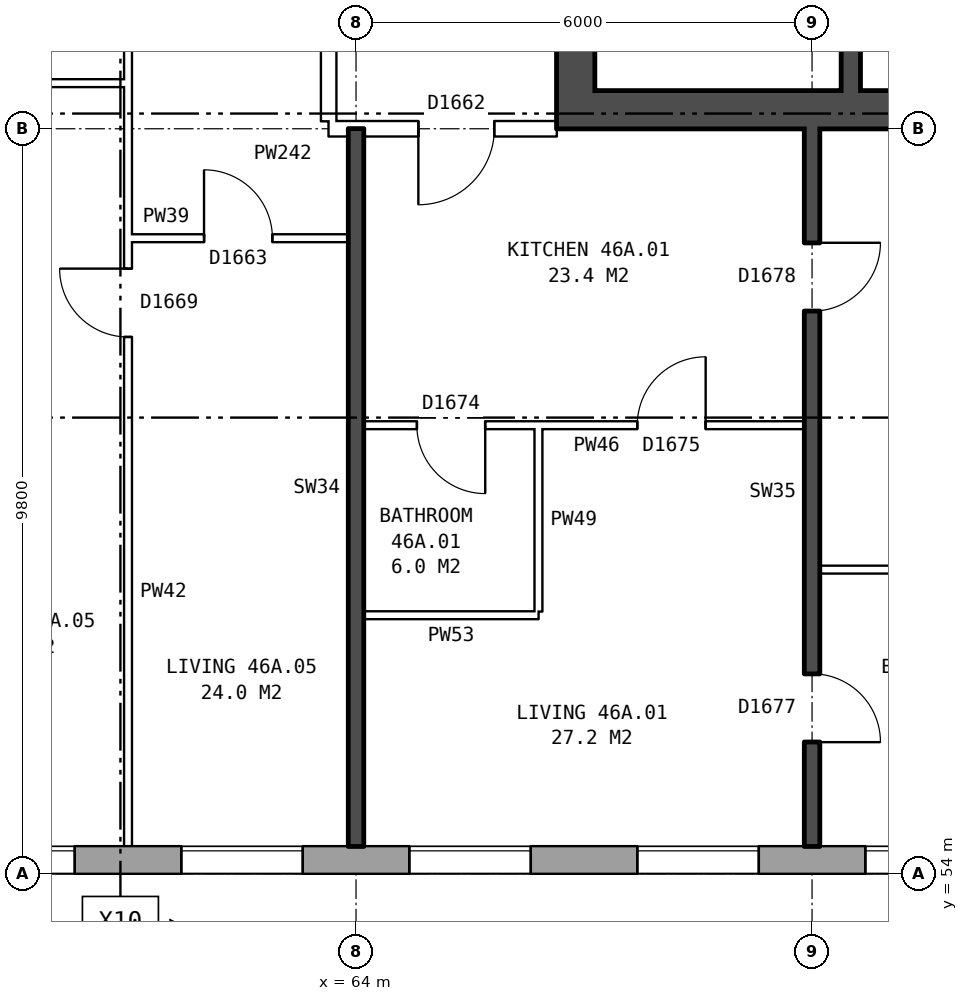
"""IFC4 building model, lengths in metres.
Left out: names, types, materials, properties, quantities, classifications, styles, units other than length and angle.
Written with IfcOpenShell. Run it as: python <this file> out.ifc"""

import sys

from ifc_helpers import new_model, si_unit, direction, frame, frame_2d, origin, place, context, subcontext, project, spatial, rectangle, extrude, element, fill, save


model = new_model("IFC4")
c1 = context("Model", 3, precision=1e-05, world=origin(), true_north=direction((0.0, 1.0)))
c2 = subcontext(c1, "Body", "Model", "MODEL_VIEW")
j1 = project(units=[si_unit("LENGTHUNIT", "METRE"), si_unit("PLANEANGLEUNIT", "RADIAN")], contexts=[c1])
p1 = place(None, origin())
s1 = spatial("IfcSite", under=j1, at=p1, CompositionType="ELEMENT")
p2 = place(p1, origin())
s2 = spatial("IfcBuilding", under=s1, at=p2, CompositionType="ELEMENT")
p3 = place(p2, frame((0.0, 0.0, 164.0)))
s3 = spatial("IfcBuildingStorey", under=s2, at=p3, CompositionType="ELEMENT", Elevation=164.0)
p4 = place(p3, frame((31.575, 54.18, 0.0), z_axis=(0.0, 0.0, 1.0), x_axis=(1.0, 0.0, 0.0)))
e1 = element("IfcWall", 1, at=p4, inside=s3, PredefinedType="STANDARD", context=c2, shape_type="SweptSolid", body=[
    extrude(rectangle(XDim=41.351, YDim=0.36, at=frame_2d((20.675, 0.0))), origin(), (0.0, 0.0, 1.0), 2.85),
])
p5 = place(p4, frame((3.125, 0.0, 0.8)))
e2 = element("IfcOpeningElement", 2, at=p5, cuts=e1, PredefinedType="OPENING", context=c2, shape_type="SweptSolid", body=[
    extrude(rectangle(XDim=1.6, YDim=1.8, at=frame_2d((0.8, 0.9))), frame((0.0, 0.19, 0.0), z_axis=(0.0, -1.0, 0.0), x_axis=(1.0, 0.0, 0.0)), (0.0, 0.0, 1.0), 0.38),
])
p6 = place(p4, frame((6.125, 0.0, 0.8)))
e3 = element("IfcOpeningElement", 3, at=p6, cuts=e1, PredefinedType="OPENING", context=c2, shape_type="SweptSolid", body=[
    extrude(rectangle(XDim=1.6, YDim=1.8, at=frame_2d((0.8, 0.9))), frame((0.0, 0.19, 0.0), z_axis=(0.0, -1.0, 0.0), x_axis=(1.0, 0.0, 0.0)), (0.0, 0.0, 1.0), 0.38),
])
p7 = place(p4, frame((9.125, 0.0, 0.8)))
e4 = element("IfcOpeningElement", 4, at=p7, cuts=e1, PredefinedType="OPENING", context=c2, shape_type="SweptSolid", body=[
    extrude(rectangle(XDim=1.6, YDim=1.8, at=frame_2d((0.8, 0.9))), frame((0.0, 0.19, 0.0), z_axis=(0.0, -1.0, 0.0), x_axis=(1.0, 0.0, 0.0)), (0.0, 0.0, 1.0), 0.38),
])
p8 = place(p4, frame((12.125, 0.0, 0.8)))
e5 = element("IfcOpeningElement", 5, at=p8, cuts=e1, PredefinedType="OPENING", context=c2, shape_type="SweptSolid", body=[
    extrude(rectangle(XDim=1.6, YDim=1.8, at=frame_2d((0.8, 0.9))), frame((0.0, 0.19, 0.0), z_axis=(0.0, -1.0, 0.0), x_axis=(1.0, 0.0, 0.0)), (0.0, 0.0, 1.0), 0.38),
])
p9 = place(p4, frame((15.125, 0.0, 0.8)))
e6 = element("IfcOpeningElement", 6, at=p9, cuts=e1, PredefinedType="OPENING", context=c2, shape_type="SweptSolid", body=[
    extrude(rectangle(XDim=1.6, YDim=1.8, at=frame_2d((0.8, 0.9))), frame((0.0, 0.19, 0.0), z_axis=(0.0, -1.0, 0.0), x_axis=(1.0, 0.0, 0.0)), (0.0, 0.0, 1.0), 0.38),
])
p10 = place(p4, frame((17.575, 0.0, 1.55)))
e7 = element("IfcOpeningElement", 7, at=p10, cuts=e1, PredefinedType="OPENING", context=c2, shape_type="SweptSolid", body=[
    extrude(rectangle(XDim=1.0, YDim=0.9, at=frame_2d((0.5, 0.45))), frame((0.0, 0.19, 0.0), z_axis=(0.0, -1.0, 0.0), x_axis=(1.0, 0.0, 0.0)), (0.0, 0.0, 1.0), 0.38),
])
p11 = place(p4, frame((20.625, 0.0, 0.25)))
e8 = element("IfcOpeningElement", 8, at=p11, cuts=e1, PredefinedType="OPENING", context=c2, shape_type="SweptSolid", body=[
    extrude(rectangle(XDim=0.6, YDim=1.5, at=frame_2d((0.3, 0.75))), frame((0.0, 0.19, 0.0), z_axis=(0.0, -1.0, 0.0), x_axis=(1.0, 0.0, 0.0)), (0.0, 0.0, 1.0), 0.38),
])
p12 = place(p4, frame((24.125, 0.0, 0.8)))
e9 = element("IfcOpeningElement", 9, at=p12, cuts=e1, PredefinedType="OPENING", context=c2, shape_type="SweptSolid", body=[
    extrude(rectangle(XDim=1.6, YDim=1.8, at=frame_2d((0.8, 0.9))), frame((0.0, 0.19, 0.0), z_axis=(0.0, -1.0, 0.0), x_axis=(1.0, 0.0, 0.0)), (0.0, 0.0, 1.0), 0.38),
])
p13 = place(p4, frame((27.125, 0.0, 0.8)))
e10 = element("IfcOpeningElement", 10, at=p13, cuts=e1, PredefinedType="OPENING", context=c2, shape_type="SweptSolid", body=[
    extrude(rectangle(XDim=1.6, YDim=1.8, at=frame_2d((0.8, 0.9))), frame((0.0, 0.19, 0.0), z_axis=(0.0, -1.0, 0.0), x_axis=(1.0, 0.0, 0.0)), (0.0, 0.0, 1.0), 0.38),
])
p14 = place(p4, frame((30.125, 0.0, 0.8)))
e11 = element("IfcOpeningElement", 11, at=p14, cuts=e1, PredefinedType="OPENING", context=c2, shape_type="SweptSolid", body=[
    extrude(rectangle(XDim=1.6, YDim=1.8, at=frame_2d((0.8, 0.9))), frame((0.0, 0.19, 0.0), z_axis=(0.0, -1.0, 0.0), x_axis=(1.0, 0.0, 0.0)), (0.0, 0.0, 1.0), 0.38),
])
p15 = place(p4, frame((33.125, 0.0, 0.8)))
e12 = element("IfcOpeningElement", 12, at=p15, cuts=e1, PredefinedType="OPENING", context=c2, shape_type="SweptSolid", body=[
    extrude(rectangle(XDim=1.6, YDim=1.8, at=frame_2d((0.8, 0.9))), frame((0.0, 0.19, 0.0), z_axis=(0.0, -1.0, 0.0), x_axis=(1.0, 0.0, 0.0)), (0.0, 0.0, 1.0), 0.38),
])
p16 = place(p4, frame((36.125, 0.0, 0.8)))
e13 = element("IfcOpeningElement", 13, at=p16, cuts=e1, PredefinedType="OPENING", context=c2, shape_type="SweptSolid", body=[
    extrude(rectangle(XDim=1.6, YDim=1.8, at=frame_2d((0.8, 0.9))), frame((0.0, 0.19, 0.0), z_axis=(0.0, -1.0, 0.0), x_axis=(1.0, 0.0, 0.0)), (0.0, 0.0, 1.0), 0.38),
])
p17 = place(p4, frame((39.125, 0.0, 0.8)))
e14 = element("IfcOpeningElement", 14, at=p17, cuts=e1, PredefinedType="OPENING", context=c2, shape_type="SweptSolid", body=[
    extrude(rectangle(XDim=1.6, YDim=1.8, at=frame_2d((0.8, 0.9))), frame((0.0, 0.19, 0.0), z_axis=(0.0, -1.0, 0.0), x_axis=(1.0, 0.0, 0.0)), (0.0, 0.0, 1.0), 0.38),
])
p18 = place(p4, frame((19.225, 0.0, 0.15)))
e15 = element("IfcOpeningElement", 15, at=p18, cuts=e1, PredefinedType="OPENING", context=c2, shape_type="SweptSolid", body=[
    extrude(rectangle(XDim=1.0, YDim=0.9, at=frame_2d((0.5, 0.45))), frame((0.0, 0.19, 0.0), z_axis=(0.0, -1.0, 0.0), x_axis=(1.0, 0.0, 0.0)), (0.0, 0.0, 1.0), 0.38),
])
p19 = place(p4, frame((21.525, 0.0, 0.15)))
e16 = element("IfcOpeningElement", 16, at=p19, cuts=e1, PredefinedType="OPENING", context=c2, shape_type="SweptSolid", body=[
    extrude(rectangle(XDim=0.6, YDim=0.9, at=frame_2d((0.3, 0.45))), frame((0.0, 0.19, 0.0), z_axis=(0.0, -1.0, 0.0), x_axis=(1.0, 0.0, 0.0)), (0.0, 0.0, 1.0), 0.38),
])
p20 = place(p4, frame((22.625, 0.0, 1.65)))
e17 = element("IfcOpeningElement", 17, at=p20, cuts=e1, PredefinedType="OPENING", context=c2, shape_type="SweptSolid", body=[
    extrude(rectangle(XDim=0.6, YDim=0.9, at=frame_2d((0.3, 0.45))), frame((0.0, 0.19, 0.0), z_axis=(0.0, -1.0, 0.0), x_axis=(1.0, 0.0, 0.0)), (0.0, 0.0, 1.0), 0.38),
])
p21 = place(p3, frame((66.89, 63.8, 0.0), z_axis=(0.0, 0.0, 1.0), x_axis=(0.0, 1.0, 0.0)))
e18 = element("IfcWall", 18, at=p21, inside=s3, PredefinedType="SHEAR", context=c2, shape_type="SweptSolid", body=[
    extrude(rectangle(XDim=12.4, YDim=0.5, at=frame_2d((6.2, 0.0))), origin(), (0.0, 0.0, 1.0), 2.85),
])
p22 = place(p21, frame((1.325, 0.0, 0.0)))
e19 = element("IfcOpeningElement", 19, at=p22, cuts=e18, PredefinedType="OPENING", context=c2, shape_type="SweptSolid", body=[
    extrude(rectangle(XDim=1.1, YDim=2.1, at=frame_2d((0.55, 1.05))), frame((0.0, 0.26, 0.0), z_axis=(0.0, -1.0, 0.0), x_axis=(1.0, 0.0, 0.0)), (0.0, 0.0, 1.0), 0.52),
])
p23 = place(p21, frame((3.6, 0.0, 0.0)))
e20 = element("IfcOpeningElement", 20, at=p23, cuts=e18, PredefinedType="OPENING", context=c2, shape_type="SweptSolid", body=[
    extrude(rectangle(XDim=1.1, YDim=2.1, at=frame_2d((0.55, 1.05))), frame((0.0, 0.26, 0.0), z_axis=(0.0, -1.0, 0.0), x_axis=(1.0, 0.0, 0.0)), (0.0, 0.0, 1.0), 0.52),
])
p24 = place(p21, frame((5.8, 0.0, 0.0)))
e21 = element("IfcOpeningElement", 21, at=p24, cuts=e18, PredefinedType="OPENING", context=c2, shape_type="SweptSolid", body=[
    extrude(rectangle(XDim=1.1, YDim=2.1, at=frame_2d((0.55, 1.05))), frame((0.0, 0.26, 0.0), z_axis=(0.0, -1.0, 0.0), x_axis=(1.0, 0.0, 0.0)), (0.0, 0.0, 1.0), 0.52),
])
p25 = place(p21, frame((8.0, 0.0, 0.0)))
e22 = element("IfcOpeningElement", 22, at=p25, cuts=e18, PredefinedType="OPENING", context=c2, shape_type="SweptSolid", body=[
    extrude(rectangle(XDim=1.1, YDim=2.1, at=frame_2d((0.55, 1.05))), frame((0.0, 0.26, 0.0), z_axis=(0.0, -1.0, 0.0), x_axis=(1.0, 0.0, 0.0)), (0.0, 0.0, 1.0), 0.52),
])
p26 = place(p21, frame((9.9, 0.0, 0.0)))
e23 = element("IfcOpeningElement", 23, at=p26, cuts=e18, PredefinedType="OPENING", context=c2, shape_type="SweptSolid", body=[
    extrude(rectangle(XDim=1.1, YDim=2.1, at=frame_2d((0.55, 1.05))), frame((0.0, 0.26, 0.0), z_axis=(0.0, -1.0, 0.0), x_axis=(1.0, 0.0, 0.0)), (0.0, 0.0, 1.0), 0.52),
])
p27 = place(p3, frame((67.14, 64.05, 0.0), z_axis=(0.0, 0.0, 1.0), x_axis=(1.0, 0.0, 0.0)))
e24 = element("IfcWall", 24, at=p27, inside=s3, PredefinedType="SHEAR", context=c2, shape_type="SweptSolid", body=[
    extrude(rectangle(XDim=8.0, YDim=0.5, at=frame_2d((4.0, 0.0))), origin(), (0.0, 0.0, 1.0), 2.85),
])
p28 = place(p3, frame((70.51, 64.3, 0.0), z_axis=(0.0, 0.0, 1.0), x_axis=(0.0, 1.0, 0.0)))
e25 = element("IfcWall", 25, at=p28, inside=s3, PredefinedType="SHEAR", context=c2, shape_type="SweptSolid", body=[
    extrude(rectangle(XDim=2.425, YDim=0.25, at=frame_2d((1.212, 0.0))), origin(), (0.0, 0.0, 1.0), 2.85),
])
p29 = place(p3, frame((63.64, 63.9, 0.0), z_axis=(0.0, 0.0, 1.0), x_axis=(0.0, 1.0, 0.0)))
e26 = element("IfcWall", 26, at=p29, inside=s3, PredefinedType="PARTITIONING", context=c2, shape_type="SweptSolid", body=[
    extrude(rectangle(XDim=12.2, YDim=0.2, at=frame_2d((6.1, 0.0))), origin(), (0.0, 0.0, 1.0), 2.85),
])
p30 = place(p29, frame((5.1, 0.0, 0.0)))
e27 = element("IfcOpeningElement", 27, at=p30, cuts=e26, PredefinedType="OPENING", context=c2, shape_type="SweptSolid", body=[
    extrude(rectangle(XDim=2.0, YDim=2.1, at=frame_2d((1.0, 1.05))), frame((0.0, 0.11, 0.0), z_axis=(0.0, -1.0, 0.0), x_axis=(1.0, 0.0, 0.0)), (0.0, 0.0, 1.0), 0.22),
])
p31 = place(p3, frame((64.1, 57.4, 0.0), z_axis=(0.0, 0.0, 1.0), x_axis=(1.0, 0.0, 0.0)))
e28 = element("IfcWall", 28, at=p31, inside=s3, PredefinedType="PARTITIONING", context=c2, shape_type="SweptSolid", body=[
    extrude(rectangle(XDim=2.3, YDim=0.1, at=frame_2d((1.15, 0.0))), origin(), (0.0, 0.0, 1.0), 2.85),
])
p32 = place(p3, frame((70.1, 58.0, 0.0), z_axis=(0.0, 0.0, 1.0), x_axis=(1.0, 0.0, 0.0)))
e29 = element("IfcWall", 29, at=p32, inside=s3, PredefinedType="PARTITIONING", context=c2, shape_type="SweptSolid", body=[
    extrude(rectangle(XDim=5.54, YDim=0.1, at=frame_2d((2.77, 0.0))), origin(), (0.0, 0.0, 1.0), 2.85),
])
p33 = place(p3, frame((64.1, 59.9, 0.0), z_axis=(0.0, 0.0, 1.0), x_axis=(1.0, 0.0, 0.0)))
e30 = element("IfcWall", 30, at=p33, inside=s3, PredefinedType="PARTITIONING", context=c2, shape_type="SweptSolid", body=[
    extrude(rectangle(XDim=5.8, YDim=0.1, at=frame_2d((2.9, 0.0))), origin(), (0.0, 0.0, 1.0), 2.85),
])
p34 = place(p33, frame((3.6, 0.0, 0.0)))
e31 = element("IfcOpeningElement", 31, at=p34, cuts=e30, PredefinedType="OPENING", context=c2, shape_type="SweptSolid", body=[
    extrude(rectangle(XDim=0.9, YDim=2.1, at=frame_2d((0.45, 1.05))), frame((0.0, 0.06, 0.0), z_axis=(0.0, -1.0, 0.0), x_axis=(1.0, 0.0, 0.0)), (0.0, 0.0, 1.0), 0.12),
])
p35 = place(p33, frame((0.7, 0.0, 0.0)))
e32 = element("IfcOpeningElement", 32, at=p35, cuts=e30, PredefinedType="OPENING", context=c2, shape_type="SweptSolid", body=[
    extrude(rectangle(XDim=0.9, YDim=2.1, at=frame_2d((0.45, 1.05))), frame((0.0, 0.06, 0.0), z_axis=(0.0, -1.0, 0.0), x_axis=(1.0, 0.0, 0.0)), (0.0, 0.0, 1.0), 0.12),
])
p36 = place(p3, frame((61.0, 62.36, 0.0), z_axis=(0.0, 0.0, 1.0), x_axis=(1.0, 0.0, 0.0)))
e33 = element("IfcWall", 33, at=p36, inside=s3, PredefinedType="PARTITIONING", context=c2, shape_type="SweptSolid", body=[
    extrude(rectangle(XDim=2.9, YDim=0.1, at=frame_2d((1.45, 0.0))), origin(), (0.0, 0.0, 1.0), 2.85),
])
p37 = place(p36, frame((1.0, 0.0, 0.0)))
e34 = element("IfcOpeningElement", 34, at=p37, cuts=e33, PredefinedType="OPENING", context=c2, shape_type="SweptSolid", body=[
    extrude(rectangle(XDim=0.9, YDim=2.1, at=frame_2d((0.45, 1.05))), frame((0.0, 0.06, 0.0), z_axis=(0.0, -1.0, 0.0), x_axis=(1.0, 0.0, 0.0)), (0.0, 0.0, 1.0), 0.12),
])
p38 = place(p3, frame((63.64, 63.8, 0.0), z_axis=(0.0, 0.0, 1.0), x_axis=(1.0, 0.0, 0.0)))
e35 = element("IfcWall", 35, at=p38, inside=s3, PredefinedType="PARTITIONING", context=c2, shape_type="SweptSolid", body=[
    extrude(rectangle(XDim=3.0, YDim=0.2, at=frame_2d((1.5, 0.0))), origin(), (0.0, 0.0, 1.0), 2.85),
])
p39 = place(p38, frame((1.18, 0.0, 0.0)))
e36 = element("IfcOpeningElement", 36, at=p39, cuts=e35, PredefinedType="OPENING", context=c2, shape_type="SweptSolid", body=[
    extrude(rectangle(XDim=1.0, YDim=2.1, at=frame_2d((0.5, 1.05))), frame((0.0, 0.11, 0.0), z_axis=(0.0, -1.0, 0.0), x_axis=(1.0, 0.0, 0.0)), (0.0, 0.0, 1.0), 0.22),
])
p40 = place(p3, frame((58.1, 64.4, 0.0), z_axis=(0.0, 0.0, 1.0), x_axis=(1.0, 0.0, 0.0)))
e37 = element("IfcWall", 37, at=p40, inside=s3, PredefinedType="PARTITIONING", context=c2, shape_type="SweptSolid", body=[
    extrude(rectangle(XDim=2.9, YDim=0.1, at=frame_2d((1.45, 0.0))), origin(), (0.0, 0.0, 1.0), 2.85),
])
p41 = place(p3, frame((61.0, 54.36, 0.0), z_axis=(0.0, 0.0, 1.0), x_axis=(0.0, 1.0, 0.0)))
e38 = element("IfcWall", 38, at=p41, inside=s3, PredefinedType="PARTITIONING", context=c2, shape_type="SweptSolid", body=[
    extrude(rectangle(XDim=14.34, YDim=0.1, at=frame_2d((7.17, 0.0))), origin(), (0.0, 0.0, 1.0), 2.85),
])
p42 = place(p41, frame((6.7, 0.0, 0.0)))
e39 = element("IfcOpeningElement", 39, at=p42, cuts=e38, PredefinedType="OPENING", context=c2, shape_type="SweptSolid", body=[
    extrude(rectangle(XDim=0.9, YDim=2.1, at=frame_2d((0.45, 1.05))), frame((0.0, 0.06, 0.0), z_axis=(0.0, -1.0, 0.0), x_axis=(1.0, 0.0, 0.0)), (0.0, 0.0, 1.0), 0.12),
])
p43 = place(p41, frame((12.54, 0.0, 0.0)))
e40 = element("IfcOpeningElement", 40, at=p43, cuts=e38, PredefinedType="OPENING", context=c2, shape_type="SweptSolid", body=[
    extrude(rectangle(XDim=0.9, YDim=2.1, at=frame_2d((0.45, 1.05))), frame((0.0, 0.06, 0.0), z_axis=(0.0, -1.0, 0.0), x_axis=(1.0, 0.0, 0.0)), (0.0, 0.0, 1.0), 0.12),
])
p44 = place(p3, frame((64.0, 54.36, 0.0), z_axis=(0.0, 0.0, 1.0), x_axis=(0.0, 1.0, 0.0)))
e41 = element("IfcWall", 41, at=p44, inside=s3, PredefinedType="SOLIDWALL", context=c2, shape_type="SweptSolid", body=[
    extrude(rectangle(XDim=9.44, YDim=0.2, at=frame_2d((4.72, 0.0))), origin(), (0.0, 0.0, 1.0), 2.85),
])
p45 = place(p3, frame((66.4, 57.45, 0.0), z_axis=(0.0, 0.0, 1.0), x_axis=(0.0, 1.0, 0.0)))
e42 = element("IfcWall", 42, at=p45, inside=s3, PredefinedType="PARTITIONING", context=c2, shape_type="SweptSolid", body=[
    extrude(rectangle(XDim=2.4, YDim=0.1, at=frame_2d((1.2, 0.0))), origin(), (0.0, 0.0, 1.0), 2.85),
])
p46 = place(p3, frame((70.0, 54.36, 0.0), z_axis=(0.0, 0.0, 1.0), x_axis=(0.0, 1.0, 0.0)))
e43 = element("IfcWall", 43, at=p46, inside=s3, PredefinedType="SOLIDWALL", context=c2, shape_type="SweptSolid", body=[
    extrude(rectangle(XDim=9.44, YDim=0.2, at=frame_2d((4.72, 0.0))), origin(), (0.0, 0.0, 1.0), 2.85),
])
p47 = place(p46, frame((1.37, 0.0, 0.0)))
e44 = element("IfcOpeningElement", 44, at=p47, cuts=e43, PredefinedType="OPENING", context=c2, shape_type="SweptSolid", body=[
    extrude(rectangle(XDim=0.9, YDim=2.1, at=frame_2d((0.45, 1.05))), frame((0.0, 0.11, 0.0), z_axis=(0.0, -1.0, 0.0), x_axis=(1.0, 0.0, 0.0)), (0.0, 0.0, 1.0), 0.22),
])
p48 = place(p46, frame((7.04, 0.0, 0.0)))
e45 = element("IfcOpeningElement", 45, at=p48, cuts=e43, PredefinedType="OPENING", context=c2, shape_type="SweptSolid", body=[
    extrude(rectangle(XDim=0.9, YDim=2.1, at=frame_2d((0.45, 1.05))), frame((0.0, 0.11, 0.0), z_axis=(0.0, -1.0, 0.0), x_axis=(1.0, 0.0, 0.0)), (0.0, 0.0, 1.0), 0.22),
])
p49 = place(p13, origin())
e46 = element("IfcWindow", 46, at=p49, inside=s3, PartitioningType="SINGLE_PANEL", PredefinedType="WINDOW", context=c2, shape_type="SweptSolid", body=[
    extrude(rectangle(XDim=1.6, YDim=1.8, at=frame_2d((0.8, 0.9))), frame((0.0, 0.15, 0.0), z_axis=(0.0, -1.0, 0.0), x_axis=(1.0, 0.0, 0.0)), (0.0, 0.0, 1.0), 0.06),
])
fill(e10, e46)
p50 = place(p14, origin())
e47 = element("IfcWindow", 47, at=p50, inside=s3, PartitioningType="SINGLE_PANEL", PredefinedType="WINDOW", context=c2, shape_type="SweptSolid", body=[
    extrude(rectangle(XDim=1.6, YDim=1.8, at=frame_2d((0.8, 0.9))), frame((0.0, 0.15, 0.0), z_axis=(0.0, -1.0, 0.0), x_axis=(1.0, 0.0, 0.0)), (0.0, 0.0, 1.0), 0.06),
])
fill(e11, e47)
p51 = place(p15, origin())
e48 = element("IfcWindow", 48, at=p51, inside=s3, PartitioningType="SINGLE_PANEL", PredefinedType="WINDOW", context=c2, shape_type="SweptSolid", body=[
    extrude(rectangle(XDim=1.6, YDim=1.8, at=frame_2d((0.8, 0.9))), frame((0.0, 0.15, 0.0), z_axis=(0.0, -1.0, 0.0), x_axis=(1.0, 0.0, 0.0)), (0.0, 0.0, 1.0), 0.06),
])
fill(e12, e48)
p52 = place(p16, origin())
e49 = element("IfcWindow", 49, at=p52, inside=s3, PartitioningType="SINGLE_PANEL", PredefinedType="WINDOW", context=c2, shape_type="SweptSolid", body=[
    extrude(rectangle(XDim=1.6, YDim=1.8, at=frame_2d((0.8, 0.9))), frame((0.0, 0.15, 0.0), z_axis=(0.0, -1.0, 0.0), x_axis=(1.0, 0.0, 0.0)), (0.0, 0.0, 1.0), 0.06),
])
fill(e13, e49)
p53 = place(p17, origin())
e50 = element("IfcWindow", 50, at=p53, inside=s3, PartitioningType="SINGLE_PANEL", PredefinedType="WINDOW", context=c2, shape_type="SweptSolid", body=[
    extrude(rectangle(XDim=1.6, YDim=1.8, at=frame_2d((0.8, 0.9))), frame((0.0, 0.15, 0.0), z_axis=(0.0, -1.0, 0.0), x_axis=(1.0, 0.0, 0.0)), (0.0, 0.0, 1.0), 0.06),
])
fill(e14, e50)
p54 = place(p47, frame((0.9, 0.0, 0.0), z_axis=(0.0, 0.0, 1.0), x_axis=(-1.0, 0.0, 0.0)))
e51 = element("IfcDoor", 51, at=p54, inside=s3, OperationType="SINGLE_SWING_RIGHT", PredefinedType="DOOR", context=c2, shape_type="SweptSolid", body=[
    extrude(rectangle(XDim=0.9, YDim=2.1, at=frame_2d((0.45, 1.05))), frame((0.0, 0.025, 0.0), z_axis=(0.0, -1.0, 0.0), x_axis=(1.0, 0.0, 0.0)), (0.0, 0.0, 1.0), 0.05),
])
fill(e44, e51)
p55 = place(p48, frame((0.9, 0.0, 0.0), z_axis=(0.0, 0.0, 1.0), x_axis=(-1.0, 0.0, 0.0)))
e52 = element("IfcDoor", 52, at=p55, inside=s3, OperationType="SINGLE_SWING_LEFT", PredefinedType="DOOR", context=c2, shape_type="SweptSolid", body=[
    extrude(rectangle(XDim=0.9, YDim=2.1, at=frame_2d((0.45, 1.05))), frame((0.0, 0.025, 0.0), z_axis=(0.0, -1.0, 0.0), x_axis=(1.0, 0.0, 0.0)), (0.0, 0.0, 1.0), 0.05),
])
fill(e45, e52)
p56 = place(p39, frame((1.0, 0.0, 0.0), z_axis=(0.0, 0.0, 1.0), x_axis=(-1.0, 0.0, 0.0)))
e53 = element("IfcDoor", 53, at=p56, inside=s3, OperationType="SINGLE_SWING_RIGHT", PredefinedType="DOOR", context=c2, shape_type="SweptSolid", body=[
    extrude(rectangle(XDim=1.0, YDim=2.1, at=frame_2d((0.5, 1.05))), frame((0.0, 0.025, 0.0), z_axis=(0.0, -1.0, 0.0), x_axis=(1.0, 0.0, 0.0)), (0.0, 0.0, 1.0), 0.05),
])
fill(e36, e53)
p57 = place(p34, origin())
e54 = element("IfcDoor", 54, at=p57, inside=s3, OperationType="SINGLE_SWING_RIGHT", PredefinedType="DOOR", context=c2, shape_type="SweptSolid", body=[
    extrude(rectangle(XDim=0.9, YDim=2.1, at=frame_2d((0.45, 1.05))), frame((0.0, 0.025, 0.0), z_axis=(0.0, -1.0, 0.0), x_axis=(1.0, 0.0, 0.0)), (0.0, 0.0, 1.0), 0.05),
])
fill(e31, e54)
p58 = place(p35, frame((0.9, 0.0, 0.0), z_axis=(0.0, 0.0, 1.0), x_axis=(-1.0, 0.0, 0.0)))
e55 = element("IfcDoor", 55, at=p58, inside=s3, OperationType="SINGLE_SWING_LEFT", PredefinedType="DOOR", context=c2, shape_type="SweptSolid", body=[
    extrude(rectangle(XDim=0.9, YDim=2.1, at=frame_2d((0.45, 1.05))), frame((0.0, 0.025, 0.0), z_axis=(0.0, -1.0, 0.0), x_axis=(1.0, 0.0, 0.0)), (0.0, 0.0, 1.0), 0.05),
])
fill(e32, e55)
p59 = place(p42, origin())
e56 = element("IfcDoor", 56, at=p59, inside=s3, OperationType="SINGLE_SWING_RIGHT", PredefinedType="DOOR", context=c2, shape_type="SweptSolid", body=[
    extrude(rectangle(XDim=0.9, YDim=2.1, at=frame_2d((0.45, 1.05))), frame((0.0, 0.025, 0.0), z_axis=(0.0, -1.0, 0.0), x_axis=(1.0, 0.0, 0.0)), (0.0, 0.0, 1.0), 0.05),
])
fill(e39, e56)
p60 = place(p37, origin())
e57 = element("IfcDoor", 57, at=p60, inside=s3, OperationType="SINGLE_SWING_LEFT", PredefinedType="DOOR", context=c2, shape_type="SweptSolid", body=[
    extrude(rectangle(XDim=0.9, YDim=2.1, at=frame_2d((0.45, 1.05))), frame((0.0, 0.025, 0.0), z_axis=(0.0, -1.0, 0.0), x_axis=(1.0, 0.0, 0.0)), (0.0, 0.0, 1.0), 0.05),
])
fill(e34, e57)
save(model, sys.argv[1])
